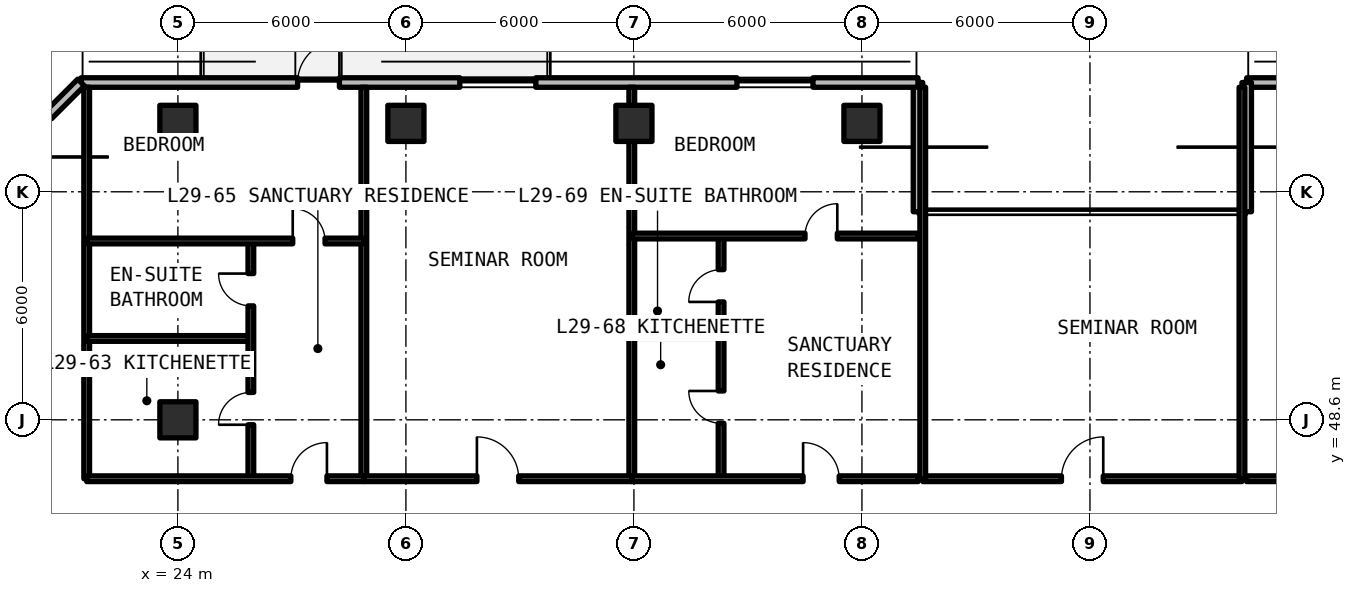
"""IFC4 building model, lengths in metres.
Left out: names, types, materials, properties, quantities, classifications, styles, units other than length and angle.
Written with IfcOpenShell. Run it as: python <this file> out.ifc"""

import sys

from ifc_helpers import new_model, si_unit, direction, frame, frame_2d, origin, origin_2d, place, context, subcontext, project, spatial, rectangle, extrude, element, fill, save


model = new_model("IFC4")
c1 = context("Model", 3, precision=1e-05, world=origin(), true_north=direction((0.0, 1.0)))
c2 = subcontext(c1, "Body", "Model", "MODEL_VIEW")
j1 = project(units=[si_unit("LENGTHUNIT", "METRE"), si_unit("PLANEANGLEUNIT", "RADIAN")], contexts=[c1])
p1 = place(None, origin())
s1 = spatial("IfcSite", under=j1, at=p1, CompositionType="ELEMENT")
p2 = place(p1, origin())
s2 = spatial("IfcBuilding", under=s1, at=p2, CompositionType="ELEMENT")
p3 = place(p2, frame((0.0, 0.0, 105.27)))
s3 = spatial("IfcBuildingStorey", under=s2, at=p3, CompositionType="ELEMENT", Elevation=105.27)
for number, where, z_axis, x_axis in (
    (1, (24.0, 48.6, 0.0), (0.0, 0.0, 1.0), (1.0, 0.0, 0.0)),
    (2, (24.0, 56.4, 0.0), (0.0, 0.0, 1.0), (1.0, 0.0, 0.0)),
    (3, (30.0, 56.4, 0.0), (0.0, 0.0, 1.0), (1.0, 0.0, 0.0)),
    (4, (36.0, 56.4, 0.0), (0.0, 0.0, 1.0), (1.0, 0.0, 0.0)),
    (5, (42.0, 56.4, 0.0), (0.0, 0.0, 1.0), (1.0, 0.0, 0.0)),
):
    element("IfcColumn", number, at=place(p3, frame(where, z_axis=z_axis, x_axis=x_axis)), inside=s3, PredefinedType="COLUMN", context=c2, shape_type="SweptSolid", body=[
        extrude(rectangle(XDim=0.95, YDim=0.95, at=origin_2d()), origin(), (0.0, 0.0, 1.0), 3.3),
    ])
p4 = place(p3, frame((96.148, 57.475, 0.0), z_axis=(0.0, 0.0, 1.0), x_axis=(-1.0, 0.0, 0.0)))
e6 = element("IfcWall", 6, at=p4, inside=s3, PredefinedType="SOLIDWALL", context=c2, shape_type="SweptSolid", body=[
    extrude(rectangle(XDim=44.023, YDim=0.25, at=frame_2d((22.012, 0.0))), origin(), (0.0, 0.0, 1.0), 3.08),
])
p5 = place(p4, frame((31.848, 0.0, 0.0)))
e7 = element("IfcOpeningElement", 7, at=p5, cuts=e6, PredefinedType="OPENING", context=c2, shape_type="SweptSolid", body=[
    extrude(rectangle(XDim=1.1, YDim=2.15, at=frame_2d((0.55, 1.075))), frame((0.0, 0.135, 0.0), z_axis=(0.0, -1.0, 0.0), x_axis=(1.0, 0.0, 0.0)), (0.0, 0.0, 1.0), 0.27),
])
p6 = place(p4, frame((19.798, 0.0, 0.0)))
e8 = element("IfcOpeningElement", 8, at=p6, cuts=e6, PredefinedType="OPENING", context=c2, shape_type="SweptSolid", body=[
    extrude(rectangle(XDim=1.1, YDim=2.15, at=frame_2d((0.55, 1.075))), frame((0.0, 0.135, 0.0), z_axis=(0.0, -1.0, 0.0), x_axis=(1.0, 0.0, 0.0)), (0.0, 0.0, 1.0), 0.27),
])
p7 = place(p4, frame((8.398, 0.0, 0.0)))
e9 = element("IfcOpeningElement", 9, at=p7, cuts=e6, PredefinedType="OPENING", context=c2, shape_type="SweptSolid", body=[
    extrude(rectangle(XDim=1.1, YDim=2.15, at=frame_2d((0.55, 1.075))), frame((0.0, 0.135, 0.0), z_axis=(0.0, -1.0, 0.0), x_axis=(1.0, 0.0, 0.0)), (0.0, 0.0, 1.0), 0.27),
])
p8 = place(p4, frame((39.028, 0.0, 0.78)))
e10 = element("IfcOpeningElement", 10, at=p8, cuts=e6, PredefinedType="OPENING", context=c2, shape_type="SweptSolid", body=[
    extrude(rectangle(XDim=2.0, YDim=1.66, at=frame_2d((1.0, 0.83))), frame((0.0, 0.135, 0.0), z_axis=(0.0, -1.0, 0.0), x_axis=(1.0, 0.0, 0.0)), (0.0, 0.0, 1.0), 0.27),
])
p9 = place(p4, frame((25.04, 0.0, 0.78)))
e11 = element("IfcOpeningElement", 11, at=p9, cuts=e6, PredefinedType="OPENING", context=c2, shape_type="SweptSolid", body=[
    extrude(rectangle(XDim=2.0, YDim=1.66, at=frame_2d((1.0, 0.83))), frame((0.0, 0.135, 0.0), z_axis=(0.0, -1.0, 0.0), x_axis=(1.0, 0.0, 0.0)), (0.0, 0.0, 1.0), 0.27),
])
p10 = place(p4, frame((2.664, 0.0, 0.78)))
e12 = element("IfcOpeningElement", 12, at=p10, cuts=e6, PredefinedType="OPENING", context=c2, shape_type="SweptSolid", body=[
    extrude(rectangle(XDim=2.0, YDim=1.66, at=frame_2d((1.0, 0.83))), frame((0.0, 0.135, 0.0), z_axis=(0.0, -1.0, 0.0), x_axis=(1.0, 0.0, 0.0)), (0.0, 0.0, 1.0), 0.27),
])
for number, where, z_axis, x_axis in (
    (13, (52.125, 57.475, 0.0), (0.0, 0.0, 1.0), (0.0, -1.0, 0.0)),
    (14, (43.475, 54.075, 0.0), (0.0, 0.0, 1.0), (0.0, 1.0, 0.0)),
):
    element("IfcWall", number, at=place(p3, frame(where, z_axis=z_axis, x_axis=x_axis)), inside=s3, PredefinedType="SOLIDWALL", context=c2, shape_type="SweptSolid", body=[
        extrude(rectangle(XDim=3.4, YDim=0.25, at=frame_2d((1.7, 0.0))), origin(), (0.0, 0.0, 1.0), 3.08),
    ])
p11 = place(p3, frame((43.475, 57.475, 0.0), z_axis=(0.0, 0.0, 1.0), x_axis=(-1.0, 0.0, 0.0)))
e15 = element("IfcWall", 15, at=p11, inside=s3, PredefinedType="SOLIDWALL", context=c2, shape_type="SweptSolid", body=[
    extrude(rectangle(XDim=22.023, YDim=0.25, at=frame_2d((11.012, 0.0))), origin(), (0.0, 0.0, 1.0), 3.08),
])
p12 = place(p11, frame((15.225, 0.0, 0.0)))
e16 = element("IfcOpeningElement", 16, at=p12, cuts=e15, PredefinedType="OPENING", context=c2, shape_type="SweptSolid", body=[
    extrude(rectangle(XDim=1.1, YDim=2.15, at=frame_2d((0.55, 1.075))), frame((0.0, 0.135, 0.0), z_axis=(0.0, -1.0, 0.0), x_axis=(1.0, 0.0, 0.0)), (0.0, 0.0, 1.0), 0.27),
])
p13 = place(p11, frame((10.057, 0.0, 0.78)))
e17 = element("IfcOpeningElement", 17, at=p13, cuts=e15, PredefinedType="OPENING", context=c2, shape_type="SweptSolid", body=[
    extrude(rectangle(XDim=2.0, YDim=1.66, at=frame_2d((1.0, 0.83))), frame((0.0, 0.135, 0.0), z_axis=(0.0, -1.0, 0.0), x_axis=(1.0, 0.0, 0.0)), (0.0, 0.0, 1.0), 0.27),
])
p14 = place(p11, frame((2.763, 0.0, 0.78)))
e18 = element("IfcOpeningElement", 18, at=p14, cuts=e15, PredefinedType="OPENING", context=c2, shape_type="SweptSolid", body=[
    extrude(rectangle(XDim=2.0, YDim=1.66, at=frame_2d((1.0, 0.83))), frame((0.0, 0.135, 0.0), z_axis=(0.0, -1.0, 0.0), x_axis=(1.0, 0.0, 0.0)), (0.0, 0.0, 1.0), 0.27),
])
p15 = place(p3, frame((21.452, 57.475, 0.0), z_axis=(0.0, 0.0, 1.0), x_axis=(-0.707106781187, -0.707106781187, 0.0)))
e19 = element("IfcWall", 19, at=p15, inside=s3, PredefinedType="SOLIDWALL", context=c2, shape_type="SweptSolid", body=[
    extrude(rectangle(XDim=5.836, YDim=0.25, at=frame_2d((2.918, 0.0))), origin(), (0.0, 0.0, 1.0), 3.08),
])
p16 = place(p15, frame((1.218, 0.0, 0.78)))
e20 = element("IfcOpeningElement", 20, at=p16, cuts=e19, PredefinedType="OPENING", context=c2, shape_type="SweptSolid", body=[
    extrude(rectangle(XDim=3.4, YDim=1.66, at=frame_2d((1.7, 0.83))), frame((0.0, 0.135, 0.0), z_axis=(0.0, -1.0, 0.0), x_axis=(1.0, 0.0, 0.0)), (0.0, 0.0, 1.0), 0.27),
])
p17 = place(p3, frame((43.6, 47.05, 0.0), z_axis=(0.0, 0.0, 1.0), x_axis=(1.0, 0.0, 0.0)))
e21 = element("IfcWall", 21, at=p17, inside=s3, PredefinedType="SOLIDWALL", context=c2, shape_type="SweptSolid", body=[
    extrude(rectangle(XDim=8.4, YDim=0.15, at=frame_2d((4.2, 0.0))), origin(), (0.0, 0.0, 1.0), 2.35),
])
p18 = place(p17, frame((3.65, 0.0, 0.0)))
e22 = element("IfcOpeningElement", 22, at=p18, cuts=e21, PredefinedType="OPENING", context=c2, shape_type="SweptSolid", body=[
    extrude(rectangle(XDim=1.1, YDim=2.15, at=frame_2d((0.55, 1.075))), frame((0.0, 0.085, 0.0), z_axis=(0.0, -1.0, 0.0), x_axis=(1.0, 0.0, 0.0)), (0.0, 0.0, 1.0), 0.17),
])
for number, where, z_axis, x_axis in (
    (23, (43.6, 47.05, 0.0), (0.0, 0.0, 1.0), (0.0, 1.0, 0.0)),
    (24, (52.0, 47.05, 0.0), (0.0, 0.0, 1.0), (0.0, 1.0, 0.0)),
    (25, (21.6, 47.05, 0.0), (0.0, 0.0, 1.0), (0.0, 1.0, 0.0)),
    (26, (28.893, 47.05, 0.0), (0.0, 0.0, 1.0), (0.0, 1.0, 0.0)),
):
    element("IfcWall", number, at=place(p3, frame(where, z_axis=z_axis, x_axis=x_axis)), inside=s3, PredefinedType="SOLIDWALL", context=c2, shape_type="SweptSolid", body=[
        extrude(rectangle(XDim=10.3, YDim=0.15, at=frame_2d((5.15, 0.0))), origin(), (0.0, 0.0, 1.0), 2.35),
    ])
p19 = place(p3, frame((21.6, 50.74, 0.0), z_axis=(0.0, 0.0, 1.0), x_axis=(1.0, 0.0, 0.0)))
e27 = element("IfcWall", 27, at=p19, inside=s3, PredefinedType="PARTITIONING", context=c2, shape_type="SweptSolid", body=[
    extrude(rectangle(XDim=4.32, YDim=0.15, at=frame_2d((2.16, 0.0))), origin(), (0.0, 0.0, 1.0), 2.35),
])
p20 = place(p3, frame((25.92, 47.05, 0.0), z_axis=(0.0, 0.0, 1.0), x_axis=(0.0, 1.0, 0.0)))
e28 = element("IfcWall", 28, at=p20, inside=s3, PredefinedType="PARTITIONING", context=c2, shape_type="SweptSolid", body=[
    extrude(rectangle(XDim=6.255, YDim=0.15, at=frame_2d((3.127, 0.0))), origin(), (0.0, 0.0, 1.0), 2.35),
])
p21 = place(p20, frame((1.42, 0.0, 0.0)))
e29 = element("IfcOpeningElement", 29, at=p21, cuts=e28, PredefinedType="OPENING", context=c2, shape_type="SweptSolid", body=[
    extrude(rectangle(XDim=0.85, YDim=2.1, at=frame_2d((0.425, 1.05))), frame((0.0, 0.085, 0.0), z_axis=(0.0, -1.0, 0.0), x_axis=(1.0, 0.0, 0.0)), (0.0, 0.0, 1.0), 0.17),
])
p22 = place(p20, frame((4.548, 0.0, 0.0)))
e30 = element("IfcOpeningElement", 30, at=p22, cuts=e28, PredefinedType="OPENING", context=c2, shape_type="SweptSolid", body=[
    extrude(rectangle(XDim=0.85, YDim=2.1, at=frame_2d((0.425, 1.05))), frame((0.0, 0.085, 0.0), z_axis=(0.0, -1.0, 0.0), x_axis=(1.0, 0.0, 0.0)), (0.0, 0.0, 1.0), 0.17),
])
p23 = place(p3, frame((21.6, 53.305, 0.0), z_axis=(0.0, 0.0, 1.0), x_axis=(1.0, 0.0, 0.0)))
e31 = element("IfcWall", 31, at=p23, inside=s3, PredefinedType="PARTITIONING", context=c2, shape_type="SweptSolid", body=[
    extrude(rectangle(XDim=7.293, YDim=0.15, at=frame_2d((3.646, 0.0))), origin(), (0.0, 0.0, 1.0), 2.35),
])
p24 = place(p23, frame((5.422, 0.0, 0.0)))
e32 = element("IfcOpeningElement", 32, at=p24, cuts=e31, PredefinedType="OPENING", context=c2, shape_type="SweptSolid", body=[
    extrude(rectangle(XDim=0.85, YDim=2.1, at=frame_2d((0.425, 1.05))), frame((0.0, 0.085, 0.0), z_axis=(0.0, -1.0, 0.0), x_axis=(1.0, 0.0, 0.0)), (0.0, 0.0, 1.0), 0.17),
])
p25 = place(p3, frame((21.6, 47.05, 0.0), z_axis=(0.0, 0.0, 1.0), x_axis=(1.0, 0.0, 0.0)))
e33 = element("IfcWall", 33, at=p25, inside=s3, PredefinedType="SOLIDWALL", context=c2, shape_type="SweptSolid", body=[
    extrude(rectangle(XDim=7.293, YDim=0.15, at=frame_2d((3.646, 0.0))), origin(), (0.0, 0.0, 1.0), 2.35),
])
p26 = place(p25, frame((5.372, 0.0, 0.0)))
e34 = element("IfcOpeningElement", 34, at=p26, cuts=e33, PredefinedType="OPENING", context=c2, shape_type="SweptSolid", body=[
    extrude(rectangle(XDim=0.95, YDim=2.15, at=frame_2d((0.475, 1.075))), frame((0.0, 0.085, 0.0), z_axis=(0.0, -1.0, 0.0), x_axis=(1.0, 0.0, 0.0)), (0.0, 0.0, 1.0), 0.17),
])
p27 = place(p3, frame((35.944, 47.05, 0.0), z_axis=(0.0, 0.0, 1.0), x_axis=(0.0, 1.0, 0.0)))
e35 = element("IfcWall", 35, at=p27, inside=s3, PredefinedType="SOLIDWALL", context=c2, shape_type="SweptSolid", body=[
    extrude(rectangle(XDim=10.3, YDim=0.15, at=frame_2d((5.15, 0.0))), origin(), (0.0, 0.0, 1.0), 2.35),
])
p28 = place(p3, frame((28.893, 47.05, 0.0), z_axis=(0.0, 0.0, 1.0), x_axis=(1.0, 0.0, 0.0)))
e36 = element("IfcWall", 36, at=p28, inside=s3, PredefinedType="SOLIDWALL", context=c2, shape_type="SweptSolid", body=[
    extrude(rectangle(XDim=7.05, YDim=0.15, at=frame_2d((3.525, 0.0))), origin(), (0.0, 0.0, 1.0), 2.35),
])
p29 = place(p28, frame((2.975, 0.0, 0.0)))
e37 = element("IfcOpeningElement", 37, at=p29, cuts=e36, PredefinedType="OPENING", context=c2, shape_type="SweptSolid", body=[
    extrude(rectangle(XDim=1.1, YDim=2.15, at=frame_2d((0.55, 1.075))), frame((0.0, 0.085, 0.0), z_axis=(0.0, -1.0, 0.0), x_axis=(1.0, 0.0, 0.0)), (0.0, 0.0, 1.0), 0.17),
])
p30 = place(p3, frame((35.944, 50.818, 0.0), z_axis=(0.0, 0.0, 1.0), x_axis=(1.0, 0.0, 0.0)))
e38 = element("IfcWall", 38, at=p30, inside=s3, PredefinedType="PARTITIONING", context=c2, shape_type="SweptSolid", body=[
    extrude(rectangle(XDim=2.35, YDim=0.15, at=frame_2d((1.175, 0.0))), origin(), (0.0, 0.0, 1.0), 2.35),
])
p31 = place(p3, frame((38.293, 47.05, 0.0), z_axis=(0.0, 0.0, 1.0), x_axis=(0.0, 1.0, 0.0)))
e39 = element("IfcWall", 39, at=p31, inside=s3, PredefinedType="PARTITIONING", context=c2, shape_type="SweptSolid", body=[
    extrude(rectangle(XDim=6.386, YDim=0.15, at=frame_2d((3.193, 0.0))), origin(), (0.0, 0.0, 1.0), 2.35),
])
p32 = place(p31, frame((1.459, 0.0, 0.0)))
e40 = element("IfcOpeningElement", 40, at=p32, cuts=e39, PredefinedType="OPENING", context=c2, shape_type="SweptSolid", body=[
    extrude(rectangle(XDim=0.85, YDim=2.1, at=frame_2d((0.425, 1.05))), frame((0.0, 0.085, 0.0), z_axis=(0.0, -1.0, 0.0), x_axis=(1.0, 0.0, 0.0)), (0.0, 0.0, 1.0), 0.17),
])
p33 = place(p31, frame((4.652, 0.0, 0.0)))
e41 = element("IfcOpeningElement", 41, at=p33, cuts=e39, PredefinedType="OPENING", context=c2, shape_type="SweptSolid", body=[
    extrude(rectangle(XDim=0.85, YDim=2.1, at=frame_2d((0.425, 1.05))), frame((0.0, 0.085, 0.0), z_axis=(0.0, -1.0, 0.0), x_axis=(1.0, 0.0, 0.0)), (0.0, 0.0, 1.0), 0.17),
])
p34 = place(p3, frame((35.944, 53.436, 0.0), z_axis=(0.0, 0.0, 1.0), x_axis=(1.0, 0.0, 0.0)))
e42 = element("IfcWall", 42, at=p34, inside=s3, PredefinedType="PARTITIONING", context=c2, shape_type="SweptSolid", body=[
    extrude(rectangle(XDim=7.536, YDim=0.15, at=frame_2d((3.768, 0.0))), origin(), (0.0, 0.0, 1.0), 2.35),
])
p35 = place(p34, frame((4.558, 0.0, 0.0)))
e43 = element("IfcOpeningElement", 43, at=p35, cuts=e42, PredefinedType="OPENING", context=c2, shape_type="SweptSolid", body=[
    extrude(rectangle(XDim=0.85, YDim=2.1, at=frame_2d((0.425, 1.05))), frame((0.0, 0.085, 0.0), z_axis=(0.0, -1.0, 0.0), x_axis=(1.0, 0.0, 0.0)), (0.0, 0.0, 1.0), 0.17),
])
p36 = place(p3, frame((35.944, 47.05, 0.0), z_axis=(0.0, 0.0, 1.0), x_axis=(1.0, 0.0, 0.0)))
e44 = element("IfcWall", 44, at=p36, inside=s3, PredefinedType="SOLIDWALL", context=c2, shape_type="SweptSolid", body=[
    extrude(rectangle(XDim=7.536, YDim=0.15, at=frame_2d((3.768, 0.0))), origin(), (0.0, 0.0, 1.0), 2.35),
])
p37 = place(p36, frame((4.508, 0.0, 0.0)))
e45 = element("IfcOpeningElement", 45, at=p37, cuts=e44, PredefinedType="OPENING", context=c2, shape_type="SweptSolid", body=[
    extrude(rectangle(XDim=0.95, YDim=2.15, at=frame_2d((0.475, 1.075))), frame((0.0, 0.085, 0.0), z_axis=(0.0, -1.0, 0.0), x_axis=(1.0, 0.0, 0.0)), (0.0, 0.0, 1.0), 0.17),
])
p38 = place(p3, frame((52.12, 47.05, 0.0), z_axis=(0.0, 0.0, 1.0), x_axis=(1.0, 0.0, 0.0)))
e46 = element("IfcWall", 46, at=p38, inside=s3, PredefinedType="SOLIDWALL", context=c2, shape_type="SweptSolid", body=[
    extrude(rectangle(XDim=8.0, YDim=0.15, at=frame_2d((4.0, 0.0))), origin(), (0.0, 0.0, 1.0), 2.35),
])
p39 = place(p38, frame((3.45, 0.0, 0.0)))
e47 = element("IfcOpeningElement", 47, at=p39, cuts=e46, PredefinedType="OPENING", context=c2, shape_type="SweptSolid", body=[
    extrude(rectangle(XDim=1.1, YDim=2.15, at=frame_2d((0.55, 1.075))), frame((0.0, 0.085, 0.0), z_axis=(0.0, -1.0, 0.0), x_axis=(1.0, 0.0, 0.0)), (0.0, 0.0, 1.0), 0.17),
])
p40 = place(p12, frame((1.1, 0.0, 0.0), z_axis=(0.0, 0.0, 1.0), x_axis=(-1.0, 0.0, 0.0)))
e48 = element("IfcDoor", 48, at=p40, inside=s3, OperationType="SINGLE_SWING_LEFT", PredefinedType="DOOR", context=c2, shape_type="SweptSolid", body=[
    extrude(rectangle(XDim=1.1, YDim=2.15, at=frame_2d((0.55, 1.075))), frame((0.0, 0.025, 0.0), z_axis=(0.0, -1.0, 0.0), x_axis=(1.0, 0.0, 0.0)), (0.0, 0.0, 1.0), 0.05),
])
fill(e16, e48)
p41 = place(p13, origin())
e49 = element("IfcWindow", 49, at=p41, inside=s3, PartitioningType="SINGLE_PANEL", PredefinedType="WINDOW", context=c2, shape_type="SweptSolid", body=[
    extrude(rectangle(XDim=2.0, YDim=1.66, at=frame_2d((1.0, 0.83))), frame((0.0, 0.03, 0.0), z_axis=(0.0, -1.0, 0.0), x_axis=(1.0, 0.0, 0.0)), (0.0, 0.0, 1.0), 0.06),
])
fill(e17, e49)
p42 = place(p14, origin())
e50 = element("IfcWindow", 50, at=p42, inside=s3, PartitioningType="SINGLE_PANEL", PredefinedType="WINDOW", context=c2, shape_type="SweptSolid", body=[
    extrude(rectangle(XDim=2.0, YDim=1.66, at=frame_2d((1.0, 0.83))), frame((0.0, 0.03, 0.0), z_axis=(0.0, -1.0, 0.0), x_axis=(1.0, 0.0, 0.0)), (0.0, 0.0, 1.0), 0.06),
])
fill(e18, e50)
p43 = place(p18, origin())
e51 = element("IfcDoor", 51, at=p43, inside=s3, OperationType="SINGLE_SWING_RIGHT", PredefinedType="DOOR", context=c2, shape_type="SweptSolid", body=[
    extrude(rectangle(XDim=1.1, YDim=2.15, at=frame_2d((0.55, 1.075))), frame((0.0, 0.025, 0.0), z_axis=(0.0, -1.0, 0.0), x_axis=(1.0, 0.0, 0.0)), (0.0, 0.0, 1.0), 0.05),
])
fill(e22, e51)
p44 = place(p21, origin())
e52 = element("IfcDoor", 52, at=p44, inside=s3, OperationType="SINGLE_SWING_LEFT", PredefinedType="DOOR", context=c2, shape_type="SweptSolid", body=[
    extrude(rectangle(XDim=0.85, YDim=2.1, at=frame_2d((0.425, 1.05))), frame((0.0, 0.025, 0.0), z_axis=(0.0, -1.0, 0.0), x_axis=(1.0, 0.0, 0.0)), (0.0, 0.0, 1.0), 0.05),
])
fill(e29, e52)
p45 = place(p22, origin())
e53 = element("IfcDoor", 53, at=p45, inside=s3, OperationType="SINGLE_SWING_RIGHT", PredefinedType="DOOR", context=c2, shape_type="SweptSolid", body=[
    extrude(rectangle(XDim=0.85, YDim=2.1, at=frame_2d((0.425, 1.05))), frame((0.0, 0.025, 0.0), z_axis=(0.0, -1.0, 0.0), x_axis=(1.0, 0.0, 0.0)), (0.0, 0.0, 1.0), 0.05),
])
fill(e30, e53)
p46 = place(p24, origin())
e54 = element("IfcDoor", 54, at=p46, inside=s3, OperationType="SINGLE_SWING_LEFT", PredefinedType="DOOR", context=c2, shape_type="SweptSolid", body=[
    extrude(rectangle(XDim=0.85, YDim=2.1, at=frame_2d((0.425, 1.05))), frame((0.0, 0.025, 0.0), z_axis=(0.0, -1.0, 0.0), x_axis=(1.0, 0.0, 0.0)), (0.0, 0.0, 1.0), 0.05),
])
fill(e32, e54)
p47 = place(p26, origin())
e55 = element("IfcDoor", 55, at=p47, inside=s3, OperationType="SINGLE_SWING_RIGHT", PredefinedType="DOOR", context=c2, shape_type="SweptSolid", body=[
    extrude(rectangle(XDim=0.95, YDim=2.15, at=frame_2d((0.475, 1.075))), frame((0.0, 0.025, 0.0), z_axis=(0.0, -1.0, 0.0), x_axis=(1.0, 0.0, 0.0)), (0.0, 0.0, 1.0), 0.05),
])
fill(e34, e55)
p48 = place(p29, origin())
e56 = element("IfcDoor", 56, at=p48, inside=s3, OperationType="SINGLE_SWING_LEFT", PredefinedType="DOOR", context=c2, shape_type="SweptSolid", body=[
    extrude(rectangle(XDim=1.1, YDim=2.15, at=frame_2d((0.55, 1.075))), frame((0.0, 0.025, 0.0), z_axis=(0.0, -1.0, 0.0), x_axis=(1.0, 0.0, 0.0)), (0.0, 0.0, 1.0), 0.05),
])
fill(e37, e56)
p49 = place(p32, origin())
e57 = element("IfcDoor", 57, at=p49, inside=s3, OperationType="SINGLE_SWING_RIGHT", PredefinedType="DOOR", context=c2, shape_type="SweptSolid", body=[
    extrude(rectangle(XDim=0.85, YDim=2.1, at=frame_2d((0.425, 1.05))), frame((0.0, 0.025, 0.0), z_axis=(0.0, -1.0, 0.0), x_axis=(1.0, 0.0, 0.0)), (0.0, 0.0, 1.0), 0.05),
])
fill(e40, e57)
p50 = place(p33, origin())
e58 = element("IfcDoor", 58, at=p50, inside=s3, OperationType="SINGLE_SWING_LEFT", PredefinedType="DOOR", context=c2, shape_type="SweptSolid", body=[
    extrude(rectangle(XDim=0.85, YDim=2.1, at=frame_2d((0.425, 1.05))), frame((0.0, 0.025, 0.0), z_axis=(0.0, -1.0, 0.0), x_axis=(1.0, 0.0, 0.0)), (0.0, 0.0, 1.0), 0.05),
])
fill(e41, e58)
p51 = place(p35, origin())
e59 = element("IfcDoor", 59, at=p51, inside=s3, OperationType="SINGLE_SWING_RIGHT", PredefinedType="DOOR", context=c2, shape_type="SweptSolid", body=[
    extrude(rectangle(XDim=0.85, YDim=2.1, at=frame_2d((0.425, 1.05))), frame((0.0, 0.025, 0.0), z_axis=(0.0, -1.0, 0.0), x_axis=(1.0, 0.0, 0.0)), (0.0, 0.0, 1.0), 0.05),
])
fill(e43, e59)
p52 = place(p37, origin())
e60 = element("IfcDoor", 60, at=p52, inside=s3, OperationType="SINGLE_SWING_LEFT", PredefinedType="DOOR", context=c2, shape_type="SweptSolid", body=[
    extrude(rectangle(XDim=0.95, YDim=2.15, at=frame_2d((0.475, 1.075))), frame((0.0, 0.025, 0.0), z_axis=(0.0, -1.0, 0.0), x_axis=(1.0, 0.0, 0.0)), (0.0, 0.0, 1.0), 0.05),
])
fill(e45, e60)
save(model, sys.argv[1])
